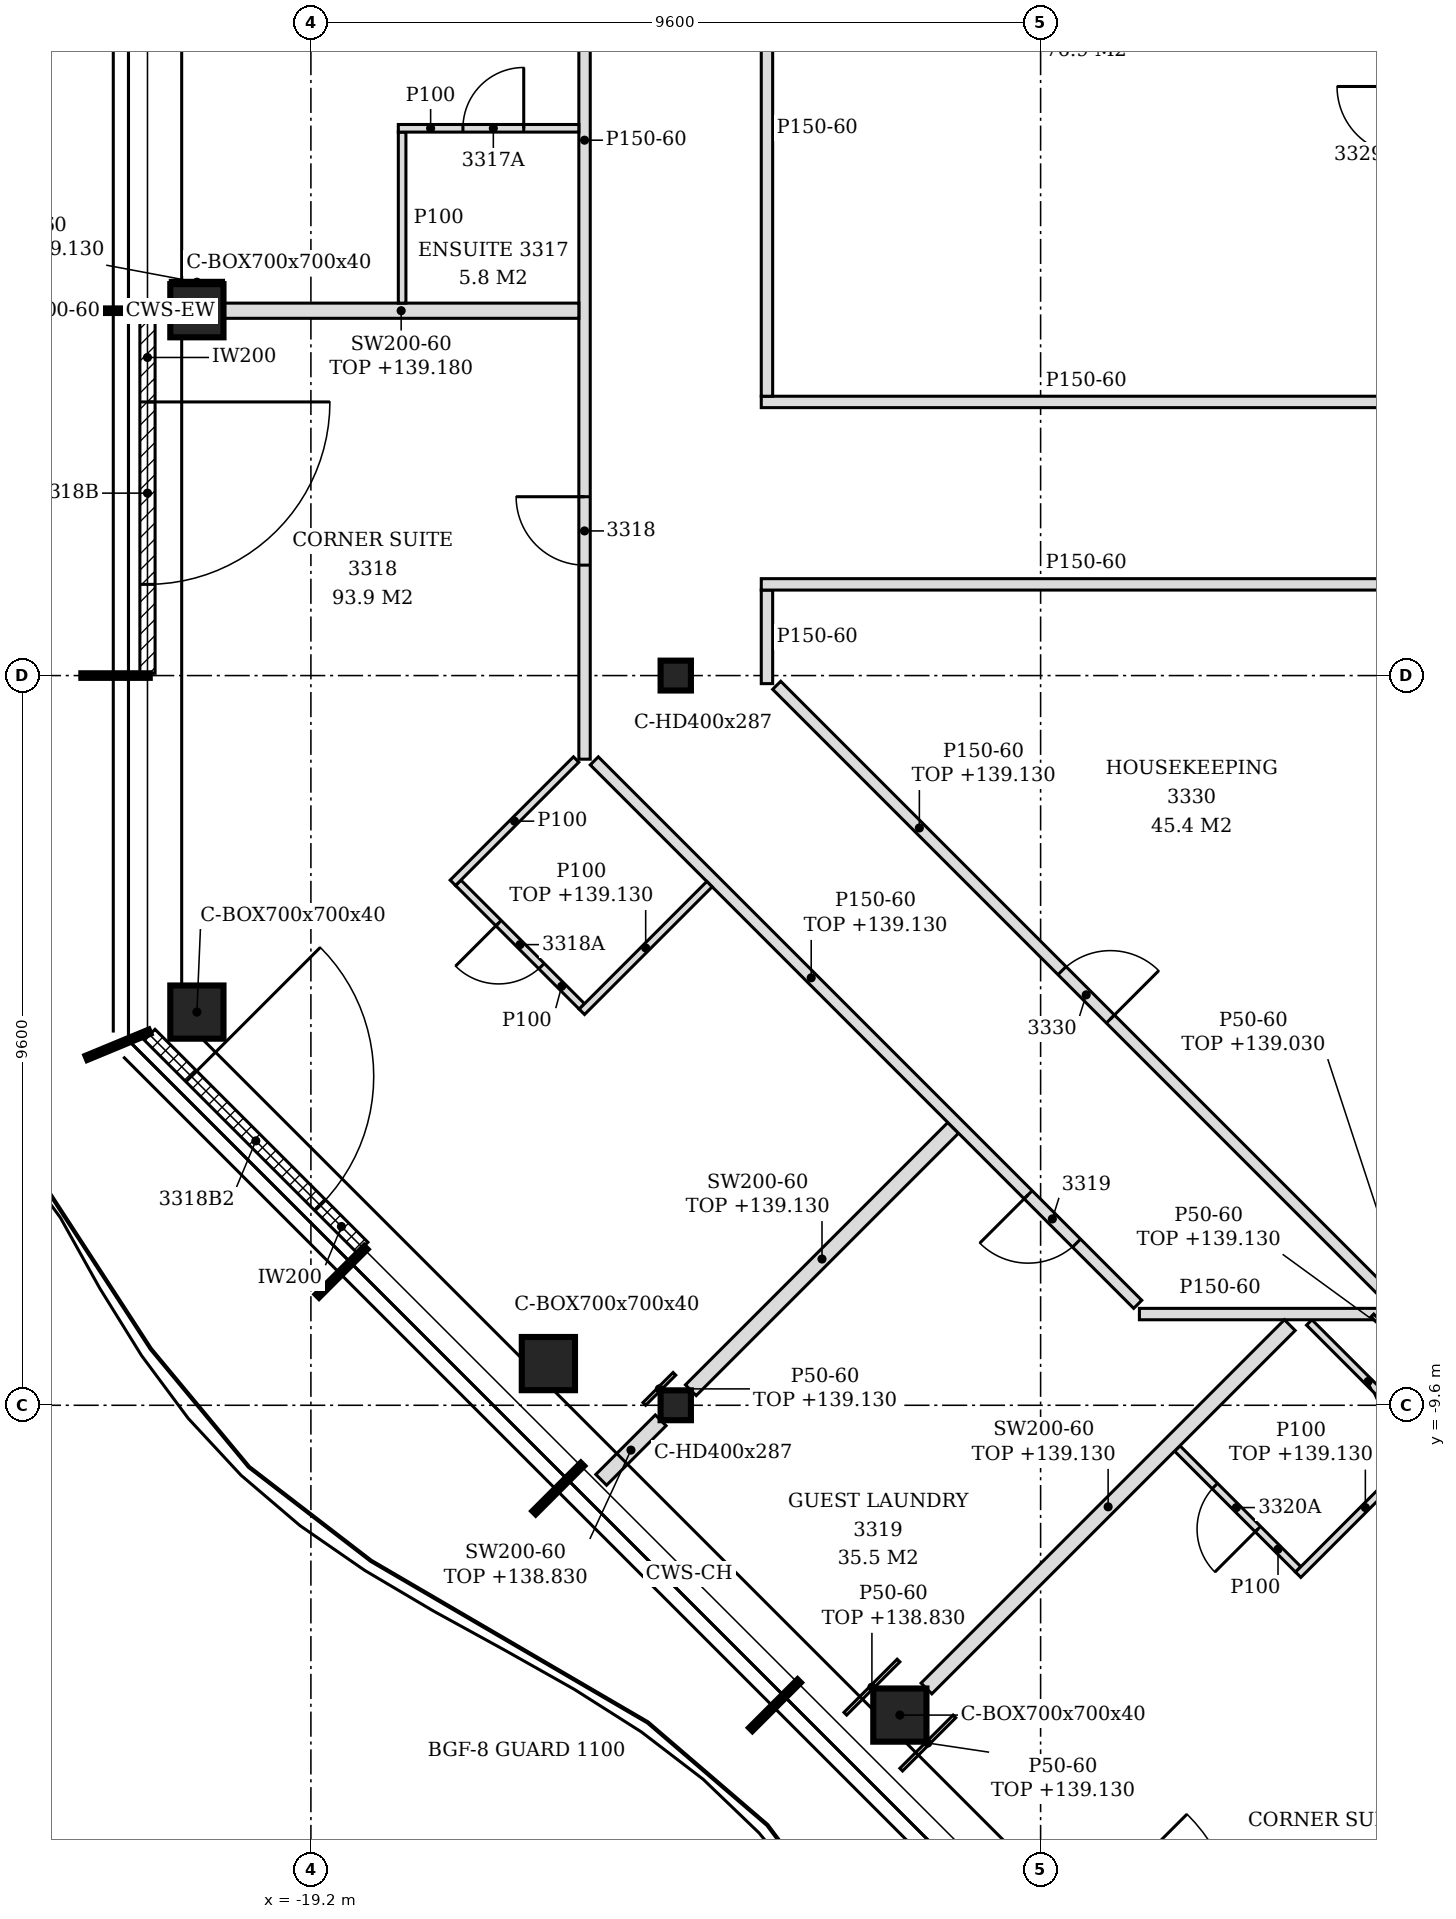
"""IFC4 building model, lengths in metres.
Left out: names, types, materials, properties, quantities, classifications, styles, units other than length and angle.
Written with IfcOpenShell. Run it as: python <this file> out.ifc"""

import sys

from ifc_helpers import new_model, si_unit, direction, frame, frame_2d, origin, origin_2d, place, context, subcontext, project, spatial, polyline, rectangle, hollow_rectangle, i_section, outline, extrude, element, fill, save


model = new_model("IFC4")
c1 = context("Model", 3, precision=1e-05, world=origin(), true_north=direction((0.0, 1.0)))
c2 = subcontext(c1, "Body", "Model", "MODEL_VIEW")
j1 = project(units=[si_unit("LENGTHUNIT", "METRE"), si_unit("PLANEANGLEUNIT", "RADIAN")], contexts=[c1])
p1 = place(None, origin())
s1 = spatial("IfcSite", under=j1, at=p1, CompositionType="ELEMENT")
p2 = place(p1, origin())
s2 = spatial("IfcBuilding", under=s1, at=p2, CompositionType="ELEMENT")
p3 = place(p2, frame((0.0, 0.0, 136.2)))
s3 = spatial("IfcBuildingStorey", under=s2, at=p3, CompositionType="ELEMENT", Elevation=136.2)
for number, where, z_axis, x_axis in (
    (1, (-20.7, 4.8, -0.15), (0.0, 0.0, 1.0), (1.0, 0.0, 0.0)),
    (2, (-20.7, -4.427, -0.15), (0.0, 0.0, 1.0), (1.0, 0.0, 0.0)),
    (3, (-16.076, -9.052, -0.15), (0.0, 0.0, 1.0), (1.0, 0.0, 0.0)),
    (4, (-11.451, -13.676, -0.15), (0.0, 0.0, 1.0), (1.0, 0.0, 0.0)),
):
    element("IfcColumn", number, at=place(p3, frame(where, z_axis=z_axis, x_axis=x_axis)), inside=s3, PredefinedType="COLUMN", context=c2, shape_type="SweptSolid", body=[
        extrude(hollow_rectangle(XDim=0.7, YDim=0.7, WallThickness=0.04, at=origin_2d()), origin(), (0.0, 0.0, 1.0), 3.6),
    ])
for number, where, z_axis, x_axis in (
    (5, (-14.4, -9.6, -0.15), (0.0, 0.0, 1.0), (1.0, 0.0, 0.0)),
    (6, (-14.4, 0.0, -0.15), (0.0, 0.0, 1.0), (1.0, 0.0, 0.0)),
):
    element("IfcColumn", number, at=place(p3, frame(where, z_axis=z_axis, x_axis=x_axis)), inside=s3, PredefinedType="COLUMN", context=c2, shape_type="SweptSolid", body=[
        extrude(i_section(OverallWidth=0.399, OverallDepth=0.393, WebThickness=0.023, FlangeThickness=0.037, FilletRadius=0.015, at=origin_2d()), origin(), (0.0, 0.0, 1.0), 3.6),
    ])
p4 = place(p3, frame((-21.35, 4.77, 0.0), z_axis=(0.0, 0.0, 1.0), x_axis=(0.0, -1.0, 0.0)))
e7 = element("IfcWall", 7, at=p4, inside=s3, PredefinedType="NOTDEFINED", context=c2, shape_type="SweptSolid", body=[
    extrude(rectangle(XDim=4.74, YDim=0.2, at=frame_2d((2.37, 0.0))), origin(), (0.0, 0.0, 1.0), 3.45),
])
p5 = place(p4, frame((1.17, 0.0, 0.0)))
e8 = element("IfcOpeningElement", 8, at=p5, cuts=e7, PredefinedType="OPENING", context=c2, shape_type="SweptSolid", body=[
    extrude(rectangle(XDim=2.4, YDim=2.4, at=frame_2d((1.2, 1.2))), frame((0.0, 0.11, 0.0), z_axis=(0.0, -1.0, 0.0), x_axis=(1.0, 0.0, 0.0)), (0.0, 0.0, 1.0), 0.22),
])
p6 = place(p3, frame((-21.322, -4.725, 0.0), z_axis=(0.0, 0.0, 1.0), x_axis=(0.707106781187, -0.707106781187, 0.0)))
e9 = element("IfcWall", 9, at=p6, inside=s3, PredefinedType="NOTDEFINED", context=c2, shape_type="SweptSolid", body=[
    extrude(rectangle(XDim=3.962, YDim=0.2, at=frame_2d((1.981, 0.0))), origin(), (0.0, 0.0, 1.0), 3.45),
])
p7 = place(p6, frame((0.775, 0.0, 0.0)))
e10 = element("IfcOpeningElement", 10, at=p7, cuts=e9, PredefinedType="OPENING", context=c2, shape_type="SweptSolid", body=[
    extrude(rectangle(XDim=2.4, YDim=2.4, at=frame_2d((1.2, 1.2))), frame((0.0, 0.11, 0.0), z_axis=(0.0, -1.0, 0.0), x_axis=(1.0, 0.0, 0.0)), (0.0, 0.0, 1.0), 0.22),
])
p8 = place(p3, frame((-11.102, -13.326, 0.0), z_axis=(0.0, 0.0, 1.0), x_axis=(0.707088722709, 0.707124839203, 0.0)))
e11 = element("IfcWall", 11, at=p8, inside=s3, PredefinedType="PARTITIONING", context=c2, shape_type="SweptSolid", body=[
    extrude(rectangle(XDim=6.76, YDim=0.2, at=frame_2d((3.38, 0.0))), origin(), (0.0, 0.0, 1.0), 2.93),
])
p9 = place(p3, frame((-6.211, -11.759, 0.0), z_axis=(0.0, 0.0, 1.0), x_axis=(-0.707106781187, 0.707106781187, 0.0)))
e12 = element("IfcWall", 12, at=p9, inside=s3, PredefinedType="PARTITIONING", context=c2, shape_type="SweptSolid", body=[
    extrude(rectangle(XDim=2.25, YDim=0.1, at=frame_2d((1.125, 0.0))), origin(), (0.0, 0.0, 1.0), 3.45),
])
p10 = place(p9, frame((0.75, 0.0, 0.0)))
e13 = element("IfcOpeningElement", 13, at=p10, cuts=e12, PredefinedType="OPENING", context=c2, shape_type="SweptSolid", body=[
    extrude(rectangle(XDim=0.8, YDim=2.1, at=frame_2d((0.4, 1.05))), frame((0.0, 0.06, 0.0), z_axis=(0.0, -1.0, 0.0), x_axis=(1.0, 0.0, 0.0)), (0.0, 0.0, 1.0), 0.12),
])
p11 = place(p3, frame((-6.211, -11.829, 0.0), z_axis=(0.0, 0.0, 1.0), x_axis=(0.707155609469, 0.707057949532, 0.0)))
e14 = element("IfcWall", 14, at=p11, inside=s3, PredefinedType="PARTITIONING", context=c2, shape_type="SweptSolid", body=[
    extrude(rectangle(XDim=2.5, YDim=0.1, at=frame_2d((1.25, 0.0))), origin(), (0.0, 0.0, 1.0), 2.93),
])
p12 = place(p3, frame((-15.381, -10.581, 0.0), z_axis=(0.0, 0.0, 1.0), x_axis=(0.707217034054, 0.706996511125, 0.0)))
e15 = element("IfcWall", 15, at=p12, inside=s3, PredefinedType="PARTITIONING", context=c2, shape_type="SweptSolid", body=[
    extrude(rectangle(XDim=1.107, YDim=0.2, at=frame_2d((0.554, 0.0))), origin(), (0.0, 0.0, 1.0), 2.63),
])
p13 = place(p3, frame((-4.514, -10.062, 0.0), z_axis=(0.0, 0.0, 1.0), x_axis=(-0.707106781187, 0.707106781187, 0.0)))
e16 = element("IfcWall", 16, at=p13, inside=s3, PredefinedType="PARTITIONING", context=c2, shape_type="SweptSolid", body=[
    extrude(rectangle(XDim=2.194, YDim=0.1, at=frame_2d((1.097, 0.0))), origin(), (0.0, 0.0, 1.0), 2.93),
])
p14 = place(p3, frame((-14.202, -9.402, 0.0), z_axis=(0.0, 0.0, 1.0), x_axis=(0.707081776084, 0.707131785404, 0.0)))
e17 = element("IfcWall", 17, at=p14, inside=s3, PredefinedType="PARTITIONING", context=c2, shape_type="SweptSolid", body=[
    extrude(rectangle(XDim=4.882, YDim=0.2, at=frame_2d((2.441, 0.0))), origin(), (0.0, 0.0, 1.0), 2.93),
])
p15 = place(p3, frame((-8.3, -8.4, 0.0), z_axis=(0.0, 0.0, 1.0), x_axis=(1.0, 0.0, 0.0)))
e18 = element("IfcWall", 18, at=p15, inside=s3, PredefinedType="PARTITIONING", context=c2, shape_type="SweptSolid", body=[
    extrude(rectangle(XDim=3.296, YDim=0.15, at=frame_2d((1.648, 0.0))), origin(), (0.0, 0.0, 1.0), 3.45),
])
p16 = place(p3, frame((-8.322, -8.272, 0.0), z_axis=(0.0, 0.0, 1.0), x_axis=(-0.707106781187, 0.707106781187, 0.0)))
e19 = element("IfcWall", 19, at=p16, inside=s3, PredefinedType="PARTITIONING", context=c2, shape_type="SweptSolid", body=[
    extrude(rectangle(XDim=10.112, YDim=0.15, at=frame_2d((5.056, 0.0))), origin(), (0.0, 0.0, 1.0), 2.93),
])
p17 = place(p16, frame((1.139, 0.0, 0.0)))
e20 = element("IfcOpeningElement", 20, at=p17, cuts=e19, PredefinedType="OPENING", context=c2, shape_type="SweptSolid", body=[
    extrude(rectangle(XDim=0.9, YDim=2.1, at=frame_2d((0.45, 1.05))), frame((0.0, 0.085, 0.0), z_axis=(0.0, -1.0, 0.0), x_axis=(1.0, 0.0, 0.0)), (0.0, 0.0, 1.0), 0.17),
])
p18 = place(p3, frame((-5.009, -8.191, 0.0), z_axis=(0.0, 0.0, 1.0), x_axis=(-0.707106781187, 0.707106781187, 0.0)))
e21 = element("IfcWall", 21, at=p18, inside=s3, PredefinedType="PARTITIONING", context=c2, shape_type="SweptSolid", body=[
    extrude(rectangle(XDim=11.404, YDim=0.15, at=frame_2d((5.702, 0.0))), origin(), (0.0, 0.0, 1.0), 2.93),
])
p19 = place(p18, frame((5.195, 0.0, 0.0)))
e22 = element("IfcOpeningElement", 22, at=p19, cuts=e21, PredefinedType="OPENING", context=c2, shape_type="SweptSolid", body=[
    extrude(rectangle(XDim=0.9, YDim=2.1, at=frame_2d((0.45, 1.05))), frame((0.0, 0.085, 0.0), z_axis=(0.0, -1.0, 0.0), x_axis=(1.0, 0.0, 0.0)), (0.0, 0.0, 1.0), 0.17),
])
p20 = place(p3, frame((-15.635, -4.353, 0.0), z_axis=(0.0, 0.0, 1.0), x_axis=(-0.707106781187, 0.707106781187, 0.0)))
e23 = element("IfcWall", 23, at=p20, inside=s3, PredefinedType="PARTITIONING", context=c2, shape_type="SweptSolid", body=[
    extrude(rectangle(XDim=2.3, YDim=0.1, at=frame_2d((1.15, 0.0))), origin(), (0.0, 0.0, 1.0), 3.45),
])
p21 = place(p20, frame((0.75, 0.0, 0.0)))
e24 = element("IfcOpeningElement", 24, at=p21, cuts=e23, PredefinedType="OPENING", context=c2, shape_type="SweptSolid", body=[
    extrude(rectangle(XDim=0.8, YDim=2.1, at=frame_2d((0.4, 1.05))), frame((0.0, 0.06, 0.0), z_axis=(0.0, -1.0, 0.0), x_axis=(1.0, 0.0, 0.0)), (0.0, 0.0, 1.0), 0.12),
])
p22 = place(p3, frame((-15.635, -4.423, 0.0), z_axis=(0.0, 0.0, 1.0), x_axis=(0.707106781187, 0.707106781187, 0.0)))
e25 = element("IfcWall", 25, at=p22, inside=s3, PredefinedType="PARTITIONING", context=c2, shape_type="SweptSolid", body=[
    extrude(rectangle(XDim=2.375, YDim=0.1, at=frame_2d((1.188, 0.0))), origin(), (0.0, 0.0, 1.0), 2.93),
])
p23 = place(p3, frame((-17.333, -2.726, 0.0), z_axis=(0.0, 0.0, 1.0), x_axis=(0.707159989116, 0.707053569253, 0.0)))
e26 = element("IfcWall", 26, at=p23, inside=s3, PredefinedType="PARTITIONING", context=c2, shape_type="SweptSolid", body=[
    extrude(rectangle(XDim=2.294, YDim=0.1, at=frame_2d((1.147, 0.0))), origin(), (0.0, 0.0, 1.0), 3.45),
])
p24 = place(p3, frame((-15.6, -1.1, 0.0), z_axis=(0.0, 0.0, 1.0), x_axis=(0.0, 1.0, 0.0)))
e27 = element("IfcWall", 27, at=p24, inside=s3, PredefinedType="PARTITIONING", context=c2, shape_type="SweptSolid", body=[
    extrude(outline(polyline([(0.0, 0.0), (12.834, 0.0), (12.834, 3.45), (10.795, 3.45), (10.793, 2.98), (10.605, 2.98), (10.603, 3.45), (5.995, 3.45), (5.993, 2.98), (5.805, 2.98), (5.803, 3.45), (1.195, 3.45), (1.193, 2.98), (1.005, 2.98), (1.003, 3.45), (0.0, 3.45), (0.0, 0.0)])), frame((0.0, 0.075, 0.0), z_axis=(0.0, -1.0, 0.0), x_axis=(1.0, 0.0, 0.0)), (0.0, 0.0, 1.0), 0.15),
])
p25 = place(p24, frame((2.553, 0.0, 0.0)))
e28 = element("IfcOpeningElement", 28, at=p25, cuts=e27, PredefinedType="OPENING", context=c2, shape_type="SweptSolid", body=[
    extrude(rectangle(XDim=0.9, YDim=2.1, at=frame_2d((0.45, 1.05))), frame((0.0, 0.085, 0.0), z_axis=(0.0, -1.0, 0.0), x_axis=(1.0, 0.0, 0.0)), (0.0, 0.0, 1.0), 0.17),
])
p26 = place(p3, frame((-13.2, -0.106, 0.0), z_axis=(0.0, 0.0, 1.0), x_axis=(0.0, 1.0, 0.0)))
e29 = element("IfcWall", 29, at=p26, inside=s3, PredefinedType="PARTITIONING", context=c2, shape_type="SweptSolid", body=[
    extrude(outline(polyline([(0.0, 0.0), (1.231, 0.0), (1.231, 3.45), (0.206, 3.45), (0.204, 2.93), (0.006, 2.93), (0.004, 3.45), (0.0, 3.45), (0.0, 0.0)])), frame((0.0, 0.075, 0.0), z_axis=(0.0, -1.0, 0.0), x_axis=(1.0, 0.0, 0.0)), (0.0, 0.0, 1.0), 0.15),
])
for number, where, z_axis, x_axis in (
    (30, (-13.275, 1.2, 0.0), (0.0, 0.0, 1.0), (1.0, 0.0, 0.0)),
    (31, (-13.275, 3.6, 0.0), (0.0, 0.0, 1.0), (1.0, 0.0, 0.0)),
):
    element("IfcWall", number, at=place(p3, frame(where, z_axis=z_axis, x_axis=x_axis)), inside=s3, PredefinedType="PARTITIONING", context=c2, shape_type="SweptSolid", body=[
        extrude(outline(polyline([(0.0, 0.0), (8.55, 0.0), (8.55, 2.83), (8.325, 2.83), (8.323, 3.45), (0.0, 3.45), (0.0, 0.0)])), frame((0.0, 0.075, 0.0), z_axis=(0.0, -1.0, 0.0), x_axis=(1.0, 0.0, 0.0)), (0.0, 0.0, 1.0), 0.15),
    ])
p27 = place(p3, frame((-13.2, 3.675, 0.0), z_axis=(0.0, 0.0, 1.0), x_axis=(0.0, 1.0, 0.0)))
e32 = element("IfcWall", 32, at=p27, inside=s3, PredefinedType="PARTITIONING", context=c2, shape_type="SweptSolid", body=[
    extrude(outline(polyline([(0.0, 0.0), (7.065, 0.0), (7.065, 3.45), (6.025, 3.45), (6.023, 2.93), (5.825, 2.93), (5.823, 3.45), (1.225, 3.45), (1.223, 2.93), (1.025, 2.93), (1.023, 3.45), (0.0, 3.45), (0.0, 0.0)])), frame((0.0, 0.075, 0.0), z_axis=(0.0, -1.0, 0.0), x_axis=(1.0, 0.0, 0.0)), (0.0, 0.0, 1.0), 0.15),
])
p28 = place(p3, frame((-21.25, 4.8, 0.0), z_axis=(0.0, 0.0, 1.0), x_axis=(1.0, 0.0, 0.0)))
e33 = element("IfcWall", 33, at=p28, inside=s3, PredefinedType="PARTITIONING", context=c2, shape_type="SweptSolid", body=[
    extrude(rectangle(XDim=0.2, YDim=0.2, at=frame_2d((0.1, 0.0))), origin(), (0.0, 0.0, 1.0), 3.45),
])
p29 = place(p3, frame((-20.35, 4.8, 0.0), z_axis=(0.0, 0.0, 1.0), x_axis=(1.0, 0.0, 0.0)))
e34 = element("IfcWall", 34, at=p29, inside=s3, PredefinedType="PARTITIONING", context=c2, shape_type="SweptSolid", body=[
    extrude(rectangle(XDim=4.675, YDim=0.2, at=frame_2d((2.337, 0.0))), origin(), (0.0, 0.0, 1.0), 2.98),
])
p30 = place(p3, frame((-18.0, 4.9, 0.0), z_axis=(0.0, 0.0, 1.0), x_axis=(0.0, 1.0, 0.0)))
e35 = element("IfcWall", 35, at=p30, inside=s3, PredefinedType="PARTITIONING", context=c2, shape_type="SweptSolid", body=[
    extrude(rectangle(XDim=2.25, YDim=0.1, at=frame_2d((1.125, 0.0))), origin(), (0.0, 0.0, 1.0), 3.45),
])
p31 = place(p3, frame((-18.05, 7.2, 0.0), z_axis=(0.0, 0.0, 1.0), x_axis=(1.0, 0.0, 0.0)))
e36 = element("IfcWall", 36, at=p31, inside=s3, PredefinedType="PARTITIONING", context=c2, shape_type="SweptSolid", body=[
    extrude(rectangle(XDim=2.375, YDim=0.1, at=frame_2d((1.188, 0.0))), origin(), (0.0, 0.0, 1.0), 3.45),
])
p32 = place(p31, frame((0.85, 0.0, 0.0)))
e37 = element("IfcOpeningElement", 37, at=p32, cuts=e36, PredefinedType="OPENING", context=c2, shape_type="SweptSolid", body=[
    extrude(rectangle(XDim=0.8, YDim=2.1, at=frame_2d((0.4, 1.05))), frame((0.0, 0.06, 0.0), z_axis=(0.0, -1.0, 0.0), x_axis=(1.0, 0.0, 0.0)), (0.0, 0.0, 1.0), 0.12),
])
p33 = place(p3, frame((-12.169, -13.658, 0.0), z_axis=(0.0, 0.0, 1.0), x_axis=(0.707106781187, 0.707106781187, 0.0)))
e38 = element("IfcWall", 38, at=p33, inside=s3, PredefinedType="PARTITIONING", context=c2, shape_type="SweptSolid", body=[
    extrude(rectangle(XDim=0.99, YDim=0.05, at=frame_2d((0.495, 0.0))), origin(), (0.0, 0.0, 1.0), 2.63),
])
p34 = place(p3, frame((-11.434, -14.393, 0.0), z_axis=(0.0, 0.0, 1.0), x_axis=(0.707106781187, 0.707106781187, 0.0)))
e39 = element("IfcWall", 39, at=p34, inside=s3, PredefinedType="PARTITIONING", context=c2, shape_type="SweptSolid", body=[
    extrude(rectangle(XDim=0.99, YDim=0.05, at=frame_2d((0.495, 0.0))), origin(), (0.0, 0.0, 1.0), 2.93),
])
p35 = place(p3, frame((-14.814, -9.582, 0.0), z_axis=(0.0, 0.0, 1.0), x_axis=(0.707106781187, 0.707106781187, 0.0)))
e40 = element("IfcWall", 40, at=p35, inside=s3, PredefinedType="PARTITIONING", context=c2, shape_type="SweptSolid", body=[
    extrude(rectangle(XDim=0.56, YDim=0.05, at=frame_2d((0.28, 0.0))), origin(), (0.0, 0.0, 1.0), 2.93),
])
p36 = place(p3, frame((-4.818, -8.835, 0.0), z_axis=(0.0, 0.0, 1.0), x_axis=(-0.707106781187, 0.707106781187, 0.0)))
e41 = element("IfcWall", 41, at=p36, inside=s3, PredefinedType="PARTITIONING", context=c2, shape_type="SweptSolid", body=[
    extrude(rectangle(XDim=0.59, YDim=0.05, at=frame_2d((0.295, 0.0))), origin(), (0.0, 0.0, 1.0), 2.93),
])
p37 = place(p3, frame((-21.05, 5.175, 0.0), z_axis=(0.0, 0.0, 1.0), x_axis=(1.0, 0.0, 0.0)))
e42 = element("IfcWall", 42, at=p37, inside=s3, PredefinedType="PARTITIONING", context=c2, shape_type="SweptSolid", body=[
    extrude(rectangle(XDim=0.7, YDim=0.05, at=frame_2d((0.35, 0.0))), origin(), (0.0, 0.0, 1.0), 2.93),
])
p38 = place(p5, origin())
e43 = element("IfcDoor", 43, at=p38, inside=s3, OperationType="SINGLE_SWING_LEFT", PredefinedType="DOOR", context=c2, shape_type="SweptSolid", body=[
    extrude(rectangle(XDim=2.4, YDim=2.4, at=frame_2d((1.2, 1.2))), frame((0.0, 0.025, 0.0), z_axis=(0.0, -1.0, 0.0), x_axis=(1.0, 0.0, 0.0)), (0.0, 0.0, 1.0), 0.05),
])
fill(e8, e43)
p39 = place(p7, origin())
e44 = element("IfcDoor", 44, at=p39, inside=s3, OperationType="SINGLE_SWING_LEFT", PredefinedType="DOOR", context=c2, shape_type="SweptSolid", body=[
    extrude(rectangle(XDim=2.4, YDim=2.4, at=frame_2d((1.2, 1.2))), frame((0.0, 0.025, 0.0), z_axis=(0.0, -1.0, 0.0), x_axis=(1.0, 0.0, 0.0)), (0.0, 0.0, 1.0), 0.05),
])
fill(e10, e44)
p40 = place(p32, origin())
e45 = element("IfcDoor", 45, at=p40, inside=s3, OperationType="SINGLE_SWING_RIGHT", PredefinedType="DOOR", context=c2, shape_type="SweptSolid", body=[
    extrude(rectangle(XDim=0.8, YDim=2.1, at=frame_2d((0.4, 1.05))), frame((0.0, 0.025, 0.0), z_axis=(0.0, -1.0, 0.0), x_axis=(1.0, 0.0, 0.0)), (0.0, 0.0, 1.0), 0.05),
])
fill(e37, e45)
p41 = place(p25, origin())
e46 = element("IfcDoor", 46, at=p41, inside=s3, OperationType="SINGLE_SWING_RIGHT", PredefinedType="DOOR", context=c2, shape_type="SweptSolid", body=[
    extrude(rectangle(XDim=0.9, YDim=2.1, at=frame_2d((0.45, 1.05))), frame((0.0, 0.025, 0.0), z_axis=(0.0, -1.0, 0.0), x_axis=(1.0, 0.0, 0.0)), (0.0, 0.0, 1.0), 0.05),
])
fill(e28, e46)
p42 = place(p21, origin())
e47 = element("IfcDoor", 47, at=p42, inside=s3, OperationType="SINGLE_SWING_RIGHT", PredefinedType="DOOR", context=c2, shape_type="SweptSolid", body=[
    extrude(rectangle(XDim=0.8, YDim=2.1, at=frame_2d((0.4, 1.05))), frame((0.0, 0.025, 0.0), z_axis=(0.0, -1.0, 0.0), x_axis=(1.0, 0.0, 0.0)), (0.0, 0.0, 1.0), 0.05),
])
fill(e24, e47)
p43 = place(p17, origin())
e48 = element("IfcDoor", 48, at=p43, inside=s3, OperationType="SINGLE_SWING_RIGHT", PredefinedType="DOOR", context=c2, shape_type="SweptSolid", body=[
    extrude(rectangle(XDim=0.9, YDim=2.1, at=frame_2d((0.45, 1.05))), frame((0.0, 0.025, 0.0), z_axis=(0.0, -1.0, 0.0), x_axis=(1.0, 0.0, 0.0)), (0.0, 0.0, 1.0), 0.05),
])
fill(e20, e48)
p44 = place(p10, origin())
e49 = element("IfcDoor", 49, at=p44, inside=s3, OperationType="SINGLE_SWING_LEFT", PredefinedType="DOOR", context=c2, shape_type="SweptSolid", body=[
    extrude(rectangle(XDim=0.8, YDim=2.1, at=frame_2d((0.4, 1.05))), frame((0.0, 0.025, 0.0), z_axis=(0.0, -1.0, 0.0), x_axis=(1.0, 0.0, 0.0)), (0.0, 0.0, 1.0), 0.05),
])
fill(e13, e49)
p45 = place(p19, frame((0.9, 0.0, 0.0), z_axis=(0.0, 0.0, 1.0), x_axis=(-1.0, 0.0, 0.0)))
e50 = element("IfcDoor", 50, at=p45, inside=s3, OperationType="SINGLE_SWING_RIGHT", PredefinedType="DOOR", context=c2, shape_type="SweptSolid", body=[
    extrude(rectangle(XDim=0.9, YDim=2.1, at=frame_2d((0.45, 1.05))), frame((0.0, 0.025, 0.0), z_axis=(0.0, -1.0, 0.0), x_axis=(1.0, 0.0, 0.0)), (0.0, 0.0, 1.0), 0.05),
])
fill(e22, e50)
save(model, sys.argv[1])
